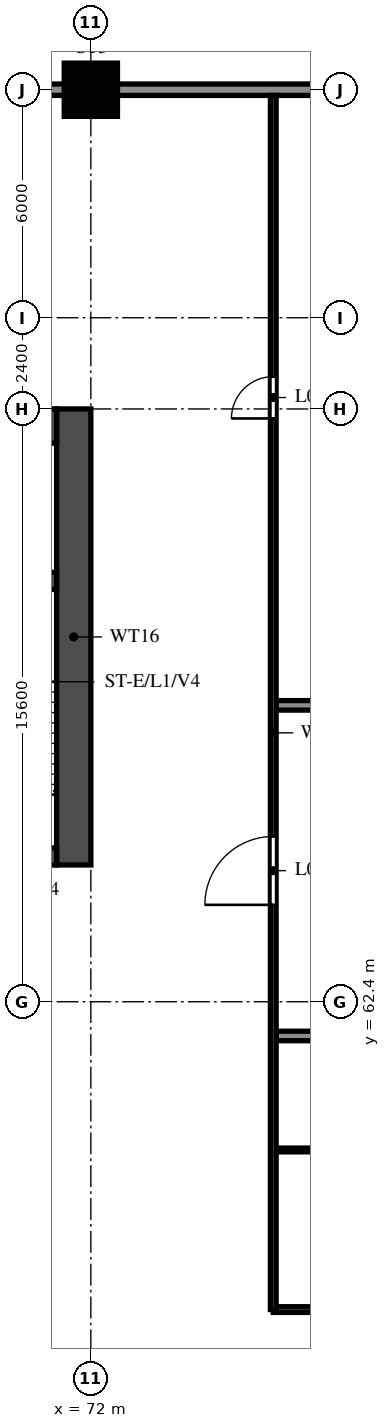
"""IFC4 building model, lengths in metres.
Left out: names, types, materials, properties, quantities, classifications, styles, units other than length and angle.
Written with IfcOpenShell. Run it as: python <this file> out.ifc"""

import sys

from ifc_helpers import new_model, si_unit, direction, frame, frame_2d, origin, origin_2d, place, context, subcontext, project, spatial, rectangle, circle, extrude, source, transform, mapped, element, fill, save


model = new_model("IFC4")
c1 = context("Model", 3, precision=1e-05, world=origin(), true_north=direction((0.0, 1.0)))
c2 = subcontext(c1, "Body", "Model", "MODEL_VIEW")
j1 = project(units=[si_unit("LENGTHUNIT", "METRE"), si_unit("PLANEANGLEUNIT", "RADIAN")], contexts=[c1])
p1 = place(None, origin())
s1 = spatial("IfcSite", under=j1, at=p1, CompositionType="ELEMENT")
p2 = place(p1, origin())
s2 = spatial("IfcBuilding", under=s1, at=p2, CompositionType="ELEMENT")
p3 = place(p2, frame((0.0, 0.0, 13.2)))
s3 = spatial("IfcBuildingStorey", under=s2, at=p3, CompositionType="ELEMENT", Elevation=13.2)
m1 = source(origin(), c2, "Body", "SweptSolid", [
    extrude(circle(Radius=0.7, at=origin_2d()), origin(), (0.0, 0.0, 1.0), 3.8),
])
p4 = place(p3, frame((72.0, 86.4, 0.0), z_axis=(0.0, 0.0, 1.0), x_axis=(1.0, 0.0, 0.0)))
e1 = element("IfcColumn", 1, at=p4, inside=s3, PredefinedType="COLUMN", context=c2, shape_type="MappedRepresentation", body=[
    mapped(m1, transform((0.0, 0.0, 0.0))),
])
p5 = place(p3, frame((71.55, 66.0, 0.0), z_axis=(0.0, 0.0, 1.0), x_axis=(0.0, 1.0, 0.0)))
e2 = element("IfcWall", 2, at=p5, inside=s3, PredefinedType="SHEAR", context=c2, shape_type="SweptSolid", body=[
    extrude(rectangle(XDim=12.0, YDim=0.9, at=frame_2d((6.0, 0.0))), origin(), (0.0, 0.0, 1.0), 3.8),
])
p6 = place(p3, frame((29.7, 77.55, 0.0), z_axis=(0.0, 0.0, 1.0), x_axis=(1.0, 0.0, 0.0)))
e3 = element("IfcWall", 3, at=p6, inside=s3, PredefinedType="SHEAR", context=c2, shape_type="SweptSolid", body=[
    extrude(rectangle(XDim=41.4, YDim=0.9, at=frame_2d((20.7, 0.0))), origin(), (0.0, 0.0, 1.0), 3.8),
])
p7 = place(p3, frame((29.7, 66.225, 0.0), z_axis=(0.0, 0.0, 1.0), x_axis=(1.0, 0.0, 0.0)))
e4 = element("IfcWall", 4, at=p7, inside=s3, PredefinedType="SHEAR", context=c2, shape_type="SweptSolid", body=[
    extrude(rectangle(XDim=41.4, YDim=0.45, at=frame_2d((20.7, 0.0))), origin(), (0.0, 0.0, 1.0), 3.8),
])
p8 = place(p7, frame((0.925, 0.0, 0.0)))
e5 = element("IfcOpeningElement", 5, at=p8, cuts=e4, PredefinedType="OPENING", context=c2, shape_type="SweptSolid", body=[
    extrude(rectangle(XDim=1.1, YDim=2.1, at=frame_2d((0.55, 1.05))), frame((0.0, 0.235, 0.0), z_axis=(0.0, -1.0, 0.0), x_axis=(1.0, 0.0, 0.0)), (0.0, 0.0, 1.0), 0.47),
])
p9 = place(p7, frame((3.738, 0.0, 0.0)))
e6 = element("IfcOpeningElement", 6, at=p9, cuts=e4, PredefinedType="OPENING", context=c2, shape_type="SweptSolid", body=[
    extrude(rectangle(XDim=1.8, YDim=2.1, at=frame_2d((0.9, 1.05))), frame((0.0, 0.235, 0.0), z_axis=(0.0, -1.0, 0.0), x_axis=(1.0, 0.0, 0.0)), (0.0, 0.0, 1.0), 0.47),
])
p10 = place(p3, frame((67.925, 73.475, 0.0), z_axis=(0.0, 0.0, 1.0), x_axis=(1.0, 0.0, 0.0)))
e7 = element("IfcWall", 7, at=p10, inside=s3, PredefinedType="SHEAR", context=c2, shape_type="SweptSolid", body=[
    extrude(rectangle(XDim=3.175, YDim=0.45, at=frame_2d((1.587, 0.0))), origin(), (0.0, 0.0, 1.0), 3.8),
])
p11 = place(p3, frame((76.8, 54.3, 0.0), z_axis=(0.0, 0.0, 1.0), x_axis=(1.0, 0.0, 0.0)))
e8 = element("IfcWall", 8, at=p11, inside=s3, PredefinedType="PARTITIONING", context=c2, shape_type="SweptSolid", body=[
    extrude(rectangle(XDim=19.75, YDim=0.15, at=frame_2d((9.875, 0.0))), origin(), (0.0, 0.0, 1.0), 2.6),
])
p12 = place(p11, frame((6.65, 0.0, 0.0)))
e9 = element("IfcOpeningElement", 9, at=p12, cuts=e8, PredefinedType="OPENING", context=c2, shape_type="SweptSolid", body=[
    extrude(rectangle(XDim=1.1, YDim=2.1, at=frame_2d((0.55, 1.05))), frame((0.0, 0.085, 0.0), z_axis=(0.0, -1.0, 0.0), x_axis=(1.0, 0.0, 0.0)), (0.0, 0.0, 1.0), 0.17),
])
p13 = place(p3, frame((76.875, 58.5, 0.0), z_axis=(0.0, 0.0, 1.0), x_axis=(1.0, 0.0, 0.0)))
e10 = element("IfcWall", 10, at=p13, inside=s3, PredefinedType="PARTITIONING", context=c2, shape_type="SweptSolid", body=[
    extrude(rectangle(XDim=4.675, YDim=0.1, at=frame_2d((2.337, 0.0))), origin(), (0.0, 0.0, 1.0), 2.6),
])
p14 = place(p3, frame((76.875, 61.5, 0.0), z_axis=(0.0, 0.0, 1.0), x_axis=(1.0, 0.0, 0.0)))
e11 = element("IfcWall", 11, at=p14, inside=s3, PredefinedType="SOLIDWALL", context=c2, shape_type="SweptSolid", body=[
    extrude(rectangle(XDim=14.325, YDim=0.25, at=frame_2d((7.163, 0.0))), origin(), (0.0, 0.0, 1.0), 2.6),
])
p15 = place(p3, frame((76.875, 70.2, 0.0), z_axis=(0.0, 0.0, 1.0), x_axis=(1.0, 0.0, 0.0)))
e12 = element("IfcWall", 12, at=p15, inside=s3, PredefinedType="SOLIDWALL", context=c2, shape_type="SweptSolid", body=[
    extrude(rectangle(XDim=23.775, YDim=0.25, at=frame_2d((11.887, 0.0))), origin(), (0.0, 0.0, 1.0), 2.6),
])
p16 = place(p3, frame((0.0, 86.4, 0.0), z_axis=(0.0, 0.0, 1.0), x_axis=(1.0, 0.0, 0.0)))
e13 = element("IfcWall", 13, at=p16, inside=s3, PredefinedType="SOLIDWALL", context=c2, shape_type="SweptSolid", body=[
    extrude(rectangle(XDim=100.8, YDim=0.3, at=frame_2d((50.4, 0.0))), origin(), (0.0, 0.0, 1.0), 3.8),
])
p17 = place(p16, frame((2.4, 0.0, 0.6)))
e14 = element("IfcOpeningElement", 14, at=p17, cuts=e13, PredefinedType="OPENING", context=c2, shape_type="SweptSolid", body=[
    extrude(rectangle(XDim=1.8, YDim=2.4, at=frame_2d((0.9, 1.2))), frame((0.0, 0.16, 0.0), z_axis=(0.0, -1.0, 0.0), x_axis=(1.0, 0.0, 0.0)), (0.0, 0.0, 1.0), 0.32),
])
p18 = place(p16, frame((6.0, 0.0, 0.6)))
e15 = element("IfcOpeningElement", 15, at=p18, cuts=e13, PredefinedType="OPENING", context=c2, shape_type="SweptSolid", body=[
    extrude(rectangle(XDim=1.8, YDim=2.4, at=frame_2d((0.9, 1.2))), frame((0.0, 0.16, 0.0), z_axis=(0.0, -1.0, 0.0), x_axis=(1.0, 0.0, 0.0)), (0.0, 0.0, 1.0), 0.32),
])
p19 = place(p16, frame((9.6, 0.0, 0.6)))
e16 = element("IfcOpeningElement", 16, at=p19, cuts=e13, PredefinedType="OPENING", context=c2, shape_type="SweptSolid", body=[
    extrude(rectangle(XDim=1.8, YDim=2.4, at=frame_2d((0.9, 1.2))), frame((0.0, 0.16, 0.0), z_axis=(0.0, -1.0, 0.0), x_axis=(1.0, 0.0, 0.0)), (0.0, 0.0, 1.0), 0.32),
])
p20 = place(p16, frame((16.8, 0.0, 0.6)))
e17 = element("IfcOpeningElement", 17, at=p20, cuts=e13, PredefinedType="OPENING", context=c2, shape_type="SweptSolid", body=[
    extrude(rectangle(XDim=1.8, YDim=2.4, at=frame_2d((0.9, 1.2))), frame((0.0, 0.16, 0.0), z_axis=(0.0, -1.0, 0.0), x_axis=(1.0, 0.0, 0.0)), (0.0, 0.0, 1.0), 0.32),
])
p21 = place(p16, frame((20.4, 0.0, 0.6)))
e18 = element("IfcOpeningElement", 18, at=p21, cuts=e13, PredefinedType="OPENING", context=c2, shape_type="SweptSolid", body=[
    extrude(rectangle(XDim=1.8, YDim=2.4, at=frame_2d((0.9, 1.2))), frame((0.0, 0.16, 0.0), z_axis=(0.0, -1.0, 0.0), x_axis=(1.0, 0.0, 0.0)), (0.0, 0.0, 1.0), 0.32),
])
p22 = place(p16, frame((78.0, 0.0, 0.6)))
e19 = element("IfcOpeningElement", 19, at=p22, cuts=e13, PredefinedType="OPENING", context=c2, shape_type="SweptSolid", body=[
    extrude(rectangle(XDim=1.8, YDim=2.4, at=frame_2d((0.9, 1.2))), frame((0.0, 0.16, 0.0), z_axis=(0.0, -1.0, 0.0), x_axis=(1.0, 0.0, 0.0)), (0.0, 0.0, 1.0), 0.32),
])
p23 = place(p16, frame((81.6, 0.0, 0.6)))
e20 = element("IfcOpeningElement", 20, at=p23, cuts=e13, PredefinedType="OPENING", context=c2, shape_type="SweptSolid", body=[
    extrude(rectangle(XDim=1.8, YDim=2.4, at=frame_2d((0.9, 1.2))), frame((0.0, 0.16, 0.0), z_axis=(0.0, -1.0, 0.0), x_axis=(1.0, 0.0, 0.0)), (0.0, 0.0, 1.0), 0.32),
])
p24 = place(p16, frame((88.8, 0.0, 0.6)))
e21 = element("IfcOpeningElement", 21, at=p24, cuts=e13, PredefinedType="OPENING", context=c2, shape_type="SweptSolid", body=[
    extrude(rectangle(XDim=1.8, YDim=2.4, at=frame_2d((0.9, 1.2))), frame((0.0, 0.16, 0.0), z_axis=(0.0, -1.0, 0.0), x_axis=(1.0, 0.0, 0.0)), (0.0, 0.0, 1.0), 0.32),
])
p25 = place(p16, frame((92.4, 0.0, 0.6)))
e22 = element("IfcOpeningElement", 22, at=p25, cuts=e13, PredefinedType="OPENING", context=c2, shape_type="SweptSolid", body=[
    extrude(rectangle(XDim=1.8, YDim=2.4, at=frame_2d((0.9, 1.2))), frame((0.0, 0.16, 0.0), z_axis=(0.0, -1.0, 0.0), x_axis=(1.0, 0.0, 0.0)), (0.0, 0.0, 1.0), 0.32),
])
p26 = place(p16, frame((96.0, 0.0, 0.6)))
e23 = element("IfcOpeningElement", 23, at=p26, cuts=e13, PredefinedType="OPENING", context=c2, shape_type="SweptSolid", body=[
    extrude(rectangle(XDim=1.8, YDim=2.4, at=frame_2d((0.9, 1.2))), frame((0.0, 0.16, 0.0), z_axis=(0.0, -1.0, 0.0), x_axis=(1.0, 0.0, 0.0)), (0.0, 0.0, 1.0), 0.32),
])
p27 = place(p3, frame((76.8, 54.3, 0.0), z_axis=(0.0, 0.0, 1.0), x_axis=(0.0, 1.0, 0.0)))
e24 = element("IfcWall", 24, at=p27, inside=s3, PredefinedType="PARTITIONING", context=c2, shape_type="SweptSolid", body=[
    extrude(rectangle(XDim=31.95, YDim=0.15, at=frame_2d((15.975, 0.0))), origin(), (0.0, 0.0, 1.0), 2.6),
])
p28 = place(p27, frame((10.65, 0.0, 0.0)))
e25 = element("IfcOpeningElement", 25, at=p28, cuts=e24, PredefinedType="OPENING", context=c2, shape_type="SweptSolid", body=[
    extrude(rectangle(XDim=1.8, YDim=2.1, at=frame_2d((0.9, 1.05))), frame((0.0, 0.085, 0.0), z_axis=(0.0, -1.0, 0.0), x_axis=(1.0, 0.0, 0.0)), (0.0, 0.0, 1.0), 0.17),
])
p29 = place(p27, frame((23.45, 0.0, 0.0)))
e26 = element("IfcOpeningElement", 26, at=p29, cuts=e24, PredefinedType="OPENING", context=c2, shape_type="SweptSolid", body=[
    extrude(rectangle(XDim=1.1, YDim=2.1, at=frame_2d((0.55, 1.05))), frame((0.0, 0.085, 0.0), z_axis=(0.0, -1.0, 0.0), x_axis=(1.0, 0.0, 0.0)), (0.0, 0.0, 1.0), 0.17),
])
p30 = place(p28, origin())
e27 = element("IfcDoor", 27, at=p30, inside=s3, OperationType="DOUBLE_DOOR_SINGLE_SWING", PredefinedType="DOOR", context=c2, shape_type="SweptSolid", body=[
    extrude(rectangle(XDim=1.8, YDim=2.1, at=frame_2d((0.9, 1.05))), frame((0.0, 0.025, 0.0), z_axis=(0.0, -1.0, 0.0), x_axis=(1.0, 0.0, 0.0)), (0.0, 0.0, 1.0), 0.05),
])
fill(e25, e27)
p31 = place(p29, origin())
e28 = element("IfcDoor", 28, at=p31, inside=s3, OperationType="SINGLE_SWING_RIGHT", PredefinedType="DOOR", context=c2, shape_type="SweptSolid", body=[
    extrude(rectangle(XDim=1.1, YDim=2.1, at=frame_2d((0.55, 1.05))), frame((0.0, 0.025, 0.0), z_axis=(0.0, -1.0, 0.0), x_axis=(1.0, 0.0, 0.0)), (0.0, 0.0, 1.0), 0.05),
])
fill(e26, e28)
save(model, sys.argv[1])
